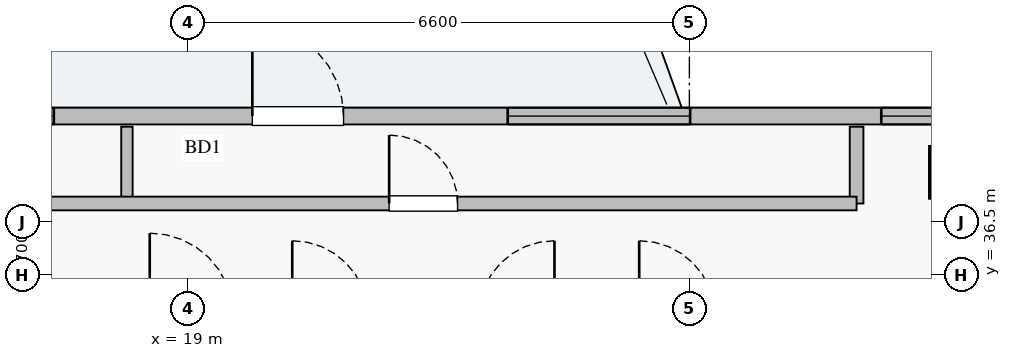
"""IFC4 building model, lengths in metres.
Left out: names, types, materials, properties, quantities, classifications, styles, units other than length and angle.
Written with IfcOpenShell. Run it as: python <this file> out.ifc"""

import sys

from ifc_helpers import new_model, si_unit, direction, frame, frame_2d, origin, origin_2d, place, context, subcontext, project, spatial, rectangle, extrude, source, transform, mapped, element, fill, save


model = new_model("IFC4")
c1 = context("Model", 3, precision=1e-05, world=origin(), true_north=direction((0.0, 1.0)))
c2 = subcontext(c1, "Body", "Model", "MODEL_VIEW")
j1 = project(units=[si_unit("LENGTHUNIT", "METRE"), si_unit("PLANEANGLEUNIT", "RADIAN")], contexts=[c1])
p1 = place(None, origin())
s1 = spatial("IfcSite", under=j1, at=p1, CompositionType="ELEMENT")
p2 = place(p1, origin())
s2 = spatial("IfcBuilding", under=s1, at=p2, CompositionType="ELEMENT")
p3 = place(p2, frame((0.0, 0.0, 247.0)))
s3 = spatial("IfcBuildingStorey", under=s2, at=p3, CompositionType="ELEMENT", Elevation=247.0)
m1 = source(origin(), c2, "Body", "SweptSolid", [
    extrude(rectangle(XDim=0.65, YDim=0.65, at=origin_2d()), origin(), (0.0, 0.0, 1.0), 3.25),
])
p4 = place(p3, frame((29.1, 37.85, 0.0), z_axis=(0.0, 0.0, 1.0), x_axis=(1.0, 0.0, 0.0)))
e1 = element("IfcColumn", 1, at=p4, inside=s3, PredefinedType="COLUMN", context=c2, shape_type="MappedRepresentation", body=[
    mapped(m1, transform((0.0, 0.0, 0.0), x_axis=(1.0, 0.0, 0.0), y_axis=(0.0, 1.0, 0.0), z_axis=(0.0, 0.0, 1.0), scale=1.0)),
])
p5 = place(p3, frame((8.35, 38.59, 0.0), z_axis=(0.0, 0.0, 1.0), x_axis=(1.0, 0.0, 0.0)))
e2 = element("IfcWall", 2, at=p5, inside=s3, PredefinedType="STANDARD", context=c2, shape_type="SweptSolid", body=[
    extrude(rectangle(XDim=21.3, YDim=0.22, at=frame_2d((10.65, 0.0))), origin(), (0.0, 0.0, 1.0), 2.61),
])
p6 = place(p5, frame((11.5, 0.0, 0.0)))
e3 = element("IfcOpeningElement", 3, at=p6, cuts=e2, PredefinedType="OPENING", context=c2, shape_type="SweptSolid", body=[
    extrude(rectangle(XDim=1.2, YDim=2.1, at=frame_2d((0.6, 1.05))), frame((0.0, 0.12, 0.0), z_axis=(0.0, -1.0, 0.0), x_axis=(1.0, 0.0, 0.0)), (0.0, 0.0, 1.0), 0.24),
])
p7 = place(p5, frame((1.463, 0.0, 0.9)))
e4 = element("IfcOpeningElement", 4, at=p7, cuts=e2, PredefinedType="OPENING", context=c2, shape_type="SweptSolid", body=[
    extrude(rectangle(XDim=2.4, YDim=1.48, at=frame_2d((1.2, 0.74))), frame((0.0, 0.12, 0.0), z_axis=(0.0, -1.0, 0.0), x_axis=(1.0, 0.0, 0.0)), (0.0, 0.0, 1.0), 0.24),
])
p8 = place(p5, frame((7.088, 0.0, 0.9)))
e5 = element("IfcOpeningElement", 5, at=p8, cuts=e2, PredefinedType="OPENING", context=c2, shape_type="SweptSolid", body=[
    extrude(rectangle(XDim=1.8, YDim=1.45, at=frame_2d((0.9, 0.725))), frame((0.0, 0.12, 0.0), z_axis=(0.0, -1.0, 0.0), x_axis=(1.0, 0.0, 0.0)), (0.0, 0.0, 1.0), 0.24),
])
p9 = place(p5, frame((19.775, 0.0, 0.9)))
e6 = element("IfcOpeningElement", 6, at=p9, cuts=e2, PredefinedType="OPENING", context=c2, shape_type="SweptSolid", body=[
    extrude(rectangle(XDim=1.2, YDim=1.4, at=frame_2d((0.6, 0.7))), frame((0.0, 0.12, 0.0), z_axis=(0.0, -1.0, 0.0), x_axis=(1.0, 0.0, 0.0)), (0.0, 0.0, 1.0), 0.24),
])
p10 = place(p5, frame((14.86, 0.0, 0.9)))
e7 = element("IfcOpeningElement", 7, at=p10, cuts=e2, PredefinedType="OPENING", context=c2, shape_type="SweptSolid", body=[
    extrude(rectangle(XDim=2.4, YDim=1.5, at=frame_2d((1.2, 0.75))), frame((0.0, 0.12, 0.0), z_axis=(0.0, -1.0, 0.0), x_axis=(1.0, 0.0, 0.0)), (0.0, 0.0, 1.0), 0.24),
])
p11 = place(p3, frame((27.8, 37.44, 0.0), z_axis=(0.0, 0.0, 1.0), x_axis=(0.0, 1.0, 0.0)))
e8 = element("IfcWall", 8, at=p11, inside=s3, PredefinedType="PARTITIONING", context=c2, shape_type="SweptSolid", body=[
    extrude(rectangle(XDim=1.01, YDim=0.18, at=frame_2d((0.505, 0.0))), origin(), (0.0, 0.0, 1.0), 3.07),
])
p12 = place(p3, frame((18.2, 37.44, 0.0), z_axis=(0.0, 0.0, 1.0), x_axis=(0.0, 1.0, 0.0)))
e9 = element("IfcWall", 9, at=p12, inside=s3, PredefinedType="PARTITIONING", context=c2, shape_type="SweptSolid", body=[
    extrude(rectangle(XDim=1.01, YDim=0.15, at=frame_2d((0.505, 0.0))), origin(), (0.0, 0.0, 1.0), 3.07),
])
p13 = place(p3, frame((8.85, 37.44, 0.0), z_axis=(0.0, 0.0, 1.0), x_axis=(1.0, 0.0, 0.0)))
e10 = element("IfcWall", 10, at=p13, inside=s3, PredefinedType="PARTITIONING", context=c2, shape_type="SweptSolid", body=[
    extrude(rectangle(XDim=18.95, YDim=0.18, at=frame_2d((9.475, 0.0))), origin(), (0.0, 0.0, 1.0), 3.07),
])
p14 = place(p13, frame((4.2, 0.0, 0.0)))
e11 = element("IfcOpeningElement", 11, at=p14, cuts=e10, PredefinedType="OPENING", context=c2, shape_type="SweptSolid", body=[
    extrude(rectangle(XDim=0.9, YDim=2.05, at=frame_2d((0.45, 1.025))), frame((0.0, 0.1, 0.0), z_axis=(0.0, -1.0, 0.0), x_axis=(1.0, 0.0, 0.0)), (0.0, 0.0, 1.0), 0.2),
])
p15 = place(p13, frame((12.8, 0.0, 0.0)))
e12 = element("IfcOpeningElement", 12, at=p15, cuts=e10, PredefinedType="OPENING", context=c2, shape_type="SweptSolid", body=[
    extrude(rectangle(XDim=0.9, YDim=2.05, at=frame_2d((0.45, 1.025))), frame((0.0, 0.1, 0.0), z_axis=(0.0, -1.0, 0.0), x_axis=(1.0, 0.0, 0.0)), (0.0, 0.0, 1.0), 0.2),
])
m2 = source(origin(), c2, "Body", "SweptSolid", [
    extrude(rectangle(XDim=1.2, YDim=2.1, at=frame_2d((0.6, 1.05))), frame((0.0, 0.025, 0.0), z_axis=(0.0, -1.0, 0.0), x_axis=(1.0, 0.0, 0.0)), (0.0, 0.0, 1.0), 0.05),
])
p16 = place(p6, origin())
e13 = element("IfcDoor", 13, at=p16, inside=s3, OperationType="SINGLE_SWING_LEFT", PredefinedType="DOOR", context=c2, shape_type="MappedRepresentation", body=[
    mapped(m2, transform((0.0, 0.0, 0.0), x_axis=(1.0, 0.0, 0.0), y_axis=(0.0, 1.0, 0.0), z_axis=(0.0, 0.0, 1.0), scale=1.0)),
])
fill(e3, e13)
m3 = source(origin(), c2, "Body", "SweptSolid", [
    extrude(rectangle(XDim=1.8, YDim=1.45, at=frame_2d((0.9, 0.725))), frame((0.0, 0.03, 0.0), z_axis=(0.0, -1.0, 0.0), x_axis=(1.0, 0.0, 0.0)), (0.0, 0.0, 1.0), 0.06),
])
p17 = place(p8, origin())
e14 = element("IfcWindow", 14, at=p17, inside=s3, PartitioningType="DOUBLE_PANEL_VERTICAL", PredefinedType="WINDOW", context=c2, shape_type="MappedRepresentation", body=[
    mapped(m3, transform((0.0, 0.0, 0.0), x_axis=(1.0, 0.0, 0.0), y_axis=(0.0, 1.0, 0.0), z_axis=(0.0, 0.0, 1.0), scale=1.0)),
])
fill(e5, e14)
m4 = source(origin(), c2, "Body", "SweptSolid", [
    extrude(rectangle(XDim=1.2, YDim=1.4, at=frame_2d((0.6, 0.7))), frame((0.0, 0.03, 0.0), z_axis=(0.0, -1.0, 0.0), x_axis=(1.0, 0.0, 0.0)), (0.0, 0.0, 1.0), 0.06),
])
p18 = place(p9, origin())
e15 = element("IfcWindow", 15, at=p18, inside=s3, PartitioningType="TRIPLE_PANEL_VERTICAL", PredefinedType="WINDOW", context=c2, shape_type="MappedRepresentation", body=[
    mapped(m4, transform((0.0, 0.0, 0.0), x_axis=(1.0, 0.0, 0.0), y_axis=(0.0, 1.0, 0.0), z_axis=(0.0, 0.0, 1.0), scale=1.0)),
])
fill(e6, e15)
m5 = source(origin(), c2, "Body", "SweptSolid", [
    extrude(rectangle(XDim=0.9, YDim=2.05, at=frame_2d((0.45, 1.025))), frame((0.0, 0.025, 0.0), z_axis=(0.0, -1.0, 0.0), x_axis=(1.0, 0.0, 0.0)), (0.0, 0.0, 1.0), 0.05),
])
p19 = place(p15, origin())
e16 = element("IfcDoor", 16, at=p19, inside=s3, OperationType="SINGLE_SWING_LEFT", PredefinedType="DOOR", context=c2, shape_type="MappedRepresentation", body=[
    mapped(m5, transform((0.0, 0.0, 0.0), x_axis=(1.0, 0.0, 0.0), y_axis=(0.0, 1.0, 0.0), z_axis=(0.0, 0.0, 1.0), scale=1.0)),
])
fill(e12, e16)
m6 = source(origin(), c2, "Body", "SweptSolid", [
    extrude(rectangle(XDim=2.4, YDim=1.5, at=frame_2d((1.2, 0.75))), frame((0.0, 0.03, 0.0), z_axis=(0.0, -1.0, 0.0), x_axis=(1.0, 0.0, 0.0)), (0.0, 0.0, 1.0), 0.06),
])
p20 = place(p10, origin())
e17 = element("IfcWindow", 17, at=p20, inside=s3, PartitioningType="TRIPLE_PANEL_VERTICAL", PredefinedType="WINDOW", context=c2, shape_type="MappedRepresentation", body=[
    mapped(m6, transform((0.0, 0.0, 0.0), x_axis=(1.0, 0.0, 0.0), y_axis=(0.0, 1.0, 0.0), z_axis=(0.0, 0.0, 1.0), scale=1.0)),
])
fill(e7, e17)
save(model, sys.argv[1])
